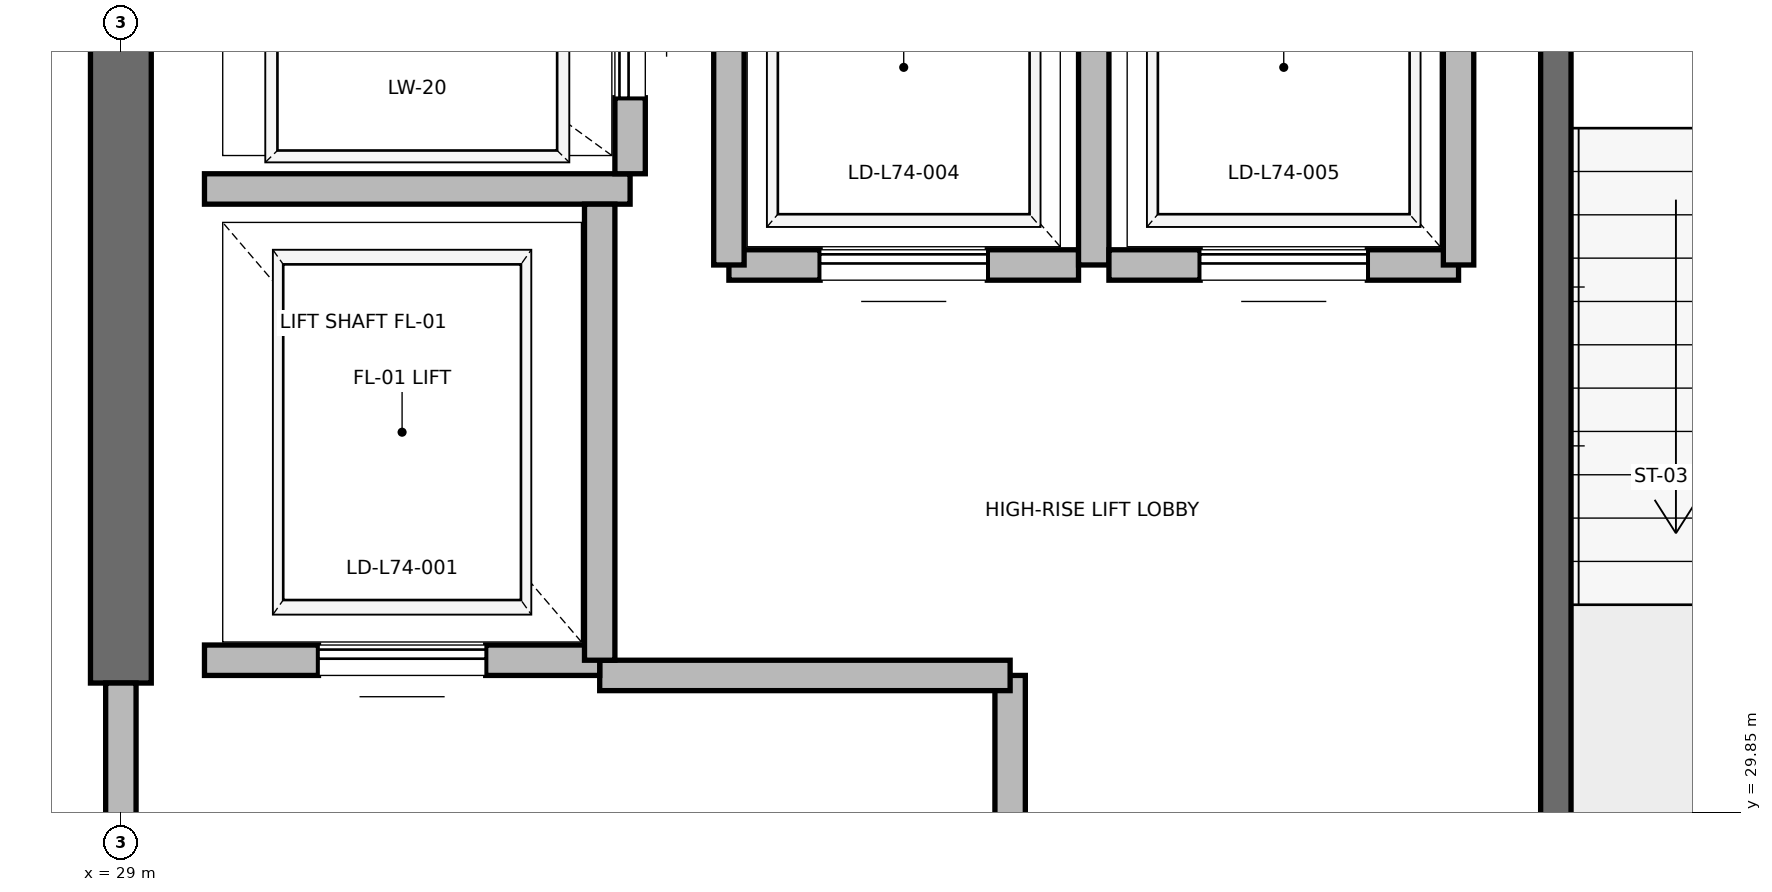
"""IFC4 building model, lengths in metres.
Left out: names, types, materials, properties, quantities, classifications, styles, units other than length and angle.
Written with IfcOpenShell. Run it as: python <this file> out.ifc"""

import sys

from ifc_helpers import new_model, si_unit, direction, frame, frame_2d, origin, place, context, subcontext, project, spatial, rectangle, extrude, element, fill, save


model = new_model("IFC4")
c1 = context("Model", 3, precision=1e-05, world=origin(), true_north=direction((0.0, 1.0)))
c2 = subcontext(c1, "Body", "Model", "MODEL_VIEW")
j1 = project(units=[si_unit("LENGTHUNIT", "METRE"), si_unit("PLANEANGLEUNIT", "RADIAN")], contexts=[c1])
p1 = place(None, origin())
s1 = spatial("IfcSite", under=j1, at=p1, CompositionType="ELEMENT")
p2 = place(p1, origin())
s2 = spatial("IfcBuilding", under=s1, at=p2, CompositionType="ELEMENT")
p3 = place(p2, frame((0.0, 0.0, 318.8)))
s3 = spatial("IfcBuildingStorey", under=s2, at=p3, CompositionType="ELEMENT", Elevation=318.8)
p4 = place(p3, frame((29.0, 30.7, 0.0), z_axis=(0.0, 0.0, 1.0), x_axis=(0.0, 1.0, 0.0)))
e1 = element("IfcWall", 1, at=p4, inside=s3, PredefinedType="SHEAR", context=c2, shape_type="SweptSolid", body=[
    extrude(rectangle(XDim=5.8, YDim=0.4, at=frame_2d((2.9, 0.0))), origin(), (0.0, 0.0, 1.0), 3.785),
])
p5 = place(p3, frame((38.44, 27.38, 0.0), z_axis=(0.0, 0.0, 1.0), x_axis=(0.0, 1.0, 0.0)))
e2 = element("IfcWall", 2, at=p5, inside=s3, PredefinedType="SOLIDWALL", context=c2, shape_type="SweptSolid", body=[
    extrude(rectangle(XDim=8.87, YDim=0.2, at=frame_2d((4.435, 0.0))), origin(), (0.0, 0.0, 1.0), 3.785),
])
p6 = place(p3, frame((34.85, 27.38, 0.0), z_axis=(0.0, 0.0, 1.0), x_axis=(0.0, 1.0, 0.0)))
e3 = element("IfcWall", 3, at=p6, inside=s3, PredefinedType="PARTITIONING", context=c2, shape_type="SweptSolid", body=[
    extrude(rectangle(XDim=3.37, YDim=0.2, at=frame_2d((1.685, 0.0))), origin(), (0.0, 0.0, 1.0), 3.785),
])
p7 = place(p6, frame((1.11, 0.0, 0.0)))
e4 = element("IfcOpeningElement", 4, at=p7, cuts=e3, PredefinedType="OPENING", context=c2, shape_type="SweptSolid", body=[
    extrude(rectangle(XDim=1.15, YDim=2.2, at=frame_2d((0.575, 1.1))), frame((0.0, 0.1, 0.0), z_axis=(0.0, -1.0, 0.0), x_axis=(1.0, 0.0, 0.0)), (0.0, 0.0, 1.0), 0.2),
])
p8 = place(p3, frame((29.0, 27.3, 0.0), z_axis=(0.0, 0.0, 1.0), x_axis=(0.0, 1.0, 0.0)))
e5 = element("IfcWall", 5, at=p8, inside=s3, PredefinedType="PARTITIONING", context=c2, shape_type="SweptSolid", body=[
    extrude(rectangle(XDim=3.4, YDim=0.2, at=frame_2d((1.7, 0.0))), origin(), (0.0, 0.0, 1.0), 2.865),
])
p9 = place(p8, frame((1.125, 0.0, 0.0)))
e6 = element("IfcOpeningElement", 6, at=p9, cuts=e5, PredefinedType="OPENING", context=c2, shape_type="SweptSolid", body=[
    extrude(rectangle(XDim=1.15, YDim=2.2, at=frame_2d((0.575, 1.1))), frame((0.0, 0.1, 0.0), z_axis=(0.0, -1.0, 0.0), x_axis=(1.0, 0.0, 0.0)), (0.0, 0.0, 1.0), 0.2),
])
p10 = place(p3, frame((32.15, 30.75, 0.0), z_axis=(0.0, 0.0, 1.0), x_axis=(1.0, 0.0, 0.0)))
e7 = element("IfcWall", 7, at=p10, inside=s3, PredefinedType="PARTITIONING", context=c2, shape_type="SweptSolid", body=[
    extrude(rectangle(XDim=2.7, YDim=0.2, at=frame_2d((1.35, 0.0))), origin(), (0.0, 0.0, 1.0), 3.785),
])
p11 = place(p3, frame((29.55, 30.85, 0.0), z_axis=(0.0, 0.0, 1.0), x_axis=(1.0, 0.0, 0.0)))
e8 = element("IfcWall", 8, at=p11, inside=s3, PredefinedType="SOLIDWALL", context=c2, shape_type="SweptSolid", body=[
    extrude(rectangle(XDim=2.6, YDim=0.2, at=frame_2d((1.3, 0.0))), origin(), (0.0, 0.0, 1.0), 2.865),
])
p12 = place(p11, frame((0.75, 0.0, 0.0)))
e9 = element("IfcOpeningElement", 9, at=p12, cuts=e8, PredefinedType="OPENING", context=c2, shape_type="SweptSolid", body=[
    extrude(rectangle(XDim=1.1, YDim=2.2, at=frame_2d((0.55, 1.1))), frame((0.0, 0.1, 0.0), z_axis=(0.0, -1.0, 0.0), x_axis=(1.0, 0.0, 0.0)), (0.0, 0.0, 1.0), 0.2),
])
p13 = place(p3, frame((29.55, 33.95, 0.0), z_axis=(0.0, 0.0, 1.0), x_axis=(1.0, 0.0, 0.0)))
e10 = element("IfcWall", 10, at=p13, inside=s3, PredefinedType="SOLIDWALL", context=c2, shape_type="SweptSolid", body=[
    extrude(rectangle(XDim=2.8, YDim=0.2, at=frame_2d((1.4, 0.0))), origin(), (0.0, 0.0, 1.0), 3.785),
])
p14 = place(p3, frame((32.15, 30.85, 0.0), z_axis=(0.0, 0.0, 1.0), x_axis=(0.0, 1.0, 0.0)))
e11 = element("IfcWall", 11, at=p14, inside=s3, PredefinedType="SOLIDWALL", context=c2, shape_type="SweptSolid", body=[
    extrude(rectangle(XDim=3.0, YDim=0.2, at=frame_2d((1.5, 0.0))), origin(), (0.0, 0.0, 1.0), 3.785),
])
p15 = place(p3, frame((32.35, 34.05, 0.0), z_axis=(0.0, 0.0, 1.0), x_axis=(0.0, 1.0, 0.0)))
e12 = element("IfcWall", 12, at=p15, inside=s3, PredefinedType="SOLIDWALL", context=c2, shape_type="SweptSolid", body=[
    extrude(rectangle(XDim=2.1, YDim=0.2, at=frame_2d((1.05, 0.0))), origin(), (0.0, 0.0, 1.0), 3.785),
])
p16 = place(p15, frame((0.5, 0.0, 0.0)))
e13 = element("IfcOpeningElement", 13, at=p16, cuts=e12, PredefinedType="OPENING", context=c2, shape_type="SweptSolid", body=[
    extrude(rectangle(XDim=1.1, YDim=2.2, at=frame_2d((0.55, 1.1))), frame((0.0, 0.1, 0.0), z_axis=(0.0, -1.0, 0.0), x_axis=(1.0, 0.0, 0.0)), (0.0, 0.0, 1.0), 0.2),
])
p17 = place(p3, frame((33.0, 33.45, 0.0), z_axis=(0.0, 0.0, 1.0), x_axis=(1.0, 0.0, 0.0)))
e14 = element("IfcWall", 14, at=p17, inside=s3, PredefinedType="SOLIDWALL", context=c2, shape_type="SweptSolid", body=[
    extrude(rectangle(XDim=2.3, YDim=0.2, at=frame_2d((1.15, 0.0))), origin(), (0.0, 0.0, 1.0), 3.785),
])
p18 = place(p17, frame((0.6, 0.0, 0.0)))
e15 = element("IfcOpeningElement", 15, at=p18, cuts=e14, PredefinedType="OPENING", context=c2, shape_type="SweptSolid", body=[
    extrude(rectangle(XDim=1.1, YDim=2.2, at=frame_2d((0.55, 1.1))), frame((0.0, 0.1, 0.0), z_axis=(0.0, -1.0, 0.0), x_axis=(1.0, 0.0, 0.0)), (0.0, 0.0, 1.0), 0.2),
])
p19 = place(p3, frame((33.0, 36.05, 0.0), z_axis=(0.0, 0.0, 1.0), x_axis=(0.0, -1.0, 0.0)))
e16 = element("IfcWall", 16, at=p19, inside=s3, PredefinedType="SOLIDWALL", context=c2, shape_type="SweptSolid", body=[
    extrude(rectangle(XDim=2.6, YDim=0.2, at=frame_2d((1.3, 0.0))), origin(), (0.0, 0.0, 1.0), 3.785),
])
p20 = place(p3, frame((35.4, 33.45, 0.0), z_axis=(0.0, 0.0, 1.0), x_axis=(0.0, 1.0, 0.0)))
e17 = element("IfcWall", 17, at=p20, inside=s3, PredefinedType="SOLIDWALL", context=c2, shape_type="SweptSolid", body=[
    extrude(rectangle(XDim=2.6, YDim=0.2, at=frame_2d((1.3, 0.0))), origin(), (0.0, 0.0, 1.0), 2.865),
])
p21 = place(p3, frame((35.5, 33.45, 0.0), z_axis=(0.0, 0.0, 1.0), x_axis=(1.0, 0.0, 0.0)))
e18 = element("IfcWall", 18, at=p21, inside=s3, PredefinedType="SOLIDWALL", context=c2, shape_type="SweptSolid", body=[
    extrude(rectangle(XDim=2.3, YDim=0.2, at=frame_2d((1.15, 0.0))), origin(), (0.0, 0.0, 1.0), 3.785),
])
p22 = place(p21, frame((0.6, 0.0, 0.0)))
e19 = element("IfcOpeningElement", 19, at=p22, cuts=e18, PredefinedType="OPENING", context=c2, shape_type="SweptSolid", body=[
    extrude(rectangle(XDim=1.1, YDim=2.2, at=frame_2d((0.55, 1.1))), frame((0.0, 0.1, 0.0), z_axis=(0.0, -1.0, 0.0), x_axis=(1.0, 0.0, 0.0)), (0.0, 0.0, 1.0), 0.2),
])
p23 = place(p3, frame((37.8, 33.45, 0.0), z_axis=(0.0, 0.0, 1.0), x_axis=(0.0, 1.0, 0.0)))
e20 = element("IfcWall", 20, at=p23, inside=s3, PredefinedType="SOLIDWALL", context=c2, shape_type="SweptSolid", body=[
    extrude(rectangle(XDim=2.6, YDim=0.2, at=frame_2d((1.3, 0.0))), origin(), (0.0, 0.0, 1.0), 2.865),
])
p24 = place(p12, origin())
e21 = element("IfcDoor", 21, at=p24, inside=s3, OperationType="SLIDING_TO_RIGHT", PredefinedType="DOOR", context=c2, shape_type="SweptSolid", body=[
    extrude(rectangle(XDim=1.1, YDim=2.2, at=frame_2d((0.55, 1.1))), frame((0.0, 0.025, 0.0), z_axis=(0.0, -1.0, 0.0), x_axis=(1.0, 0.0, 0.0)), (0.0, 0.0, 1.0), 0.05),
])
fill(e9, e21)
p25 = place(p16, origin())
e22 = element("IfcDoor", 22, at=p25, inside=s3, OperationType="SLIDING_TO_RIGHT", PredefinedType="DOOR", context=c2, shape_type="SweptSolid", body=[
    extrude(rectangle(XDim=1.1, YDim=2.2, at=frame_2d((0.55, 1.1))), frame((0.0, 0.025, 0.0), z_axis=(0.0, -1.0, 0.0), x_axis=(1.0, 0.0, 0.0)), (0.0, 0.0, 1.0), 0.05),
])
fill(e13, e22)
p26 = place(p18, origin())
e23 = element("IfcDoor", 23, at=p26, inside=s3, OperationType="SLIDING_TO_RIGHT", PredefinedType="DOOR", context=c2, shape_type="SweptSolid", body=[
    extrude(rectangle(XDim=1.1, YDim=2.2, at=frame_2d((0.55, 1.1))), frame((0.0, 0.025, 0.0), z_axis=(0.0, -1.0, 0.0), x_axis=(1.0, 0.0, 0.0)), (0.0, 0.0, 1.0), 0.05),
])
fill(e15, e23)
p27 = place(p22, origin())
e24 = element("IfcDoor", 24, at=p27, inside=s3, OperationType="SLIDING_TO_RIGHT", PredefinedType="DOOR", context=c2, shape_type="SweptSolid", body=[
    extrude(rectangle(XDim=1.1, YDim=2.2, at=frame_2d((0.55, 1.1))), frame((0.0, 0.025, 0.0), z_axis=(0.0, -1.0, 0.0), x_axis=(1.0, 0.0, 0.0)), (0.0, 0.0, 1.0), 0.05),
])
fill(e19, e24)
save(model, sys.argv[1])
